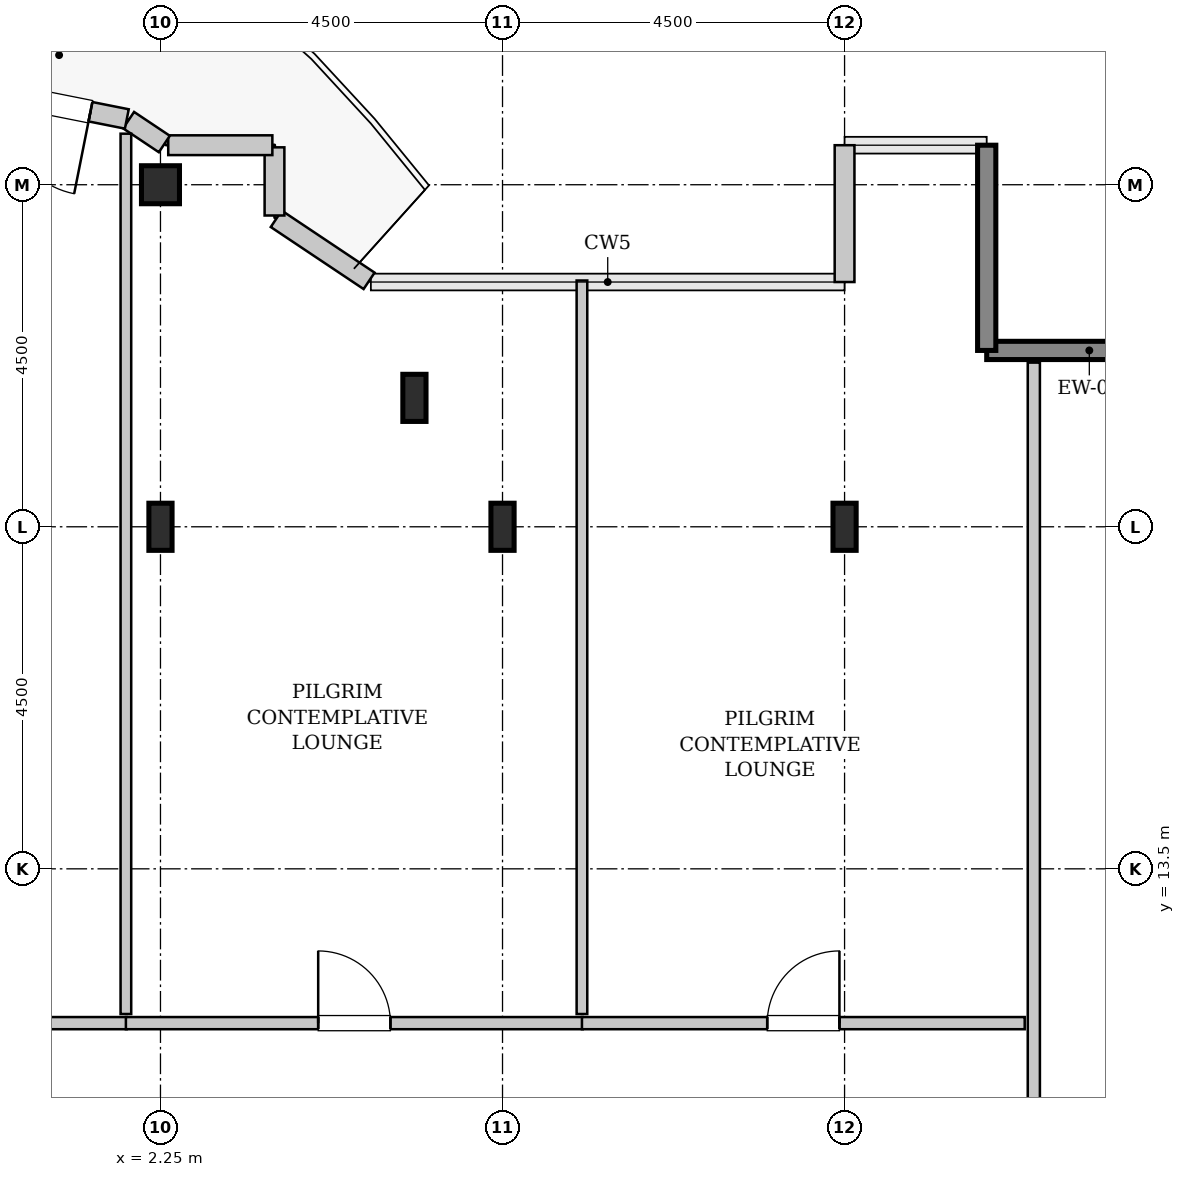
"""IFC4 building model, lengths in metres.
Left out: names, types, materials, properties, quantities, classifications, styles, units other than length and angle.
Written with IfcOpenShell. Run it as: python <this file> out.ifc"""

import sys

from ifc_helpers import new_model, si_unit, direction, frame, frame_2d, origin, origin_2d, place, context, subcontext, project, spatial, rectangle, hollow_rectangle, i_section, extrude, source, transform, mapped, element, fill, save


model = new_model("IFC4")
c1 = context("Model", 3, precision=1e-05, world=origin(), true_north=direction((0.0, 1.0)))
c2 = subcontext(c1, "Body", "Model", "MODEL_VIEW")
j1 = project(units=[si_unit("LENGTHUNIT", "METRE"), si_unit("PLANEANGLEUNIT", "RADIAN")], contexts=[c1])
p1 = place(None, origin())
s1 = spatial("IfcSite", under=j1, at=p1, CompositionType="ELEMENT")
p2 = place(p1, origin())
s2 = spatial("IfcBuilding", under=s1, at=p2, CompositionType="ELEMENT")
p3 = place(p2, frame((0.0, 0.0, 295.0)))
s3 = spatial("IfcBuildingStorey", under=s2, at=p3, CompositionType="ELEMENT", Elevation=295.0)
m1 = source(origin(), c2, "Body", "SweptSolid", [
    extrude(i_section(OverallWidth=0.305, OverallDepth=0.62, WebThickness=0.021, FlangeThickness=0.04, FilletRadius=0.027, at=origin_2d()), origin(), (0.0, 0.0, 1.0), 3.8),
])
p4 = place(p3, frame((2.25, 18.0, 0.0), z_axis=(0.0, 0.0, 1.0), x_axis=(1.0, 0.0, 0.0)))
e1 = element("IfcColumn", 1, at=p4, inside=s3, PredefinedType="COLUMN", context=c2, shape_type="MappedRepresentation", body=[
    mapped(m1, transform((0.0, 0.0, 0.0), x_axis=(1.0, 0.0, 0.0), y_axis=(0.0, 1.0, 0.0), z_axis=(0.0, 0.0, 1.0), scale=1.0)),
])
m2 = source(origin(), c2, "Body", "SweptSolid", [
    extrude(hollow_rectangle(XDim=0.5, YDim=0.5, WallThickness=0.025, InnerFilletRadius=0.025, OuterFilletRadius=0.05, at=origin_2d()), origin(), (0.0, 0.0, 1.0), 3.8),
])
p5 = place(p3, frame((2.25, 22.5, 0.0), z_axis=(0.0, 0.0, 1.0), x_axis=(1.0, 0.0, 0.0)))
e2 = element("IfcColumn", 2, at=p5, inside=s3, PredefinedType="COLUMN", context=c2, shape_type="MappedRepresentation", body=[
    mapped(m2, transform((0.0, 0.0, 0.0), x_axis=(1.0, 0.0, 0.0), y_axis=(0.0, 1.0, 0.0), z_axis=(0.0, 0.0, 1.0), scale=1.0)),
])
for number, where, z_axis, x_axis in (
    (3, (5.591, 19.696, 0.0), (0.0, 0.0, 1.0), (1.0, 0.0, 0.0)),
    (4, (6.75, 18.0, 0.0), (0.0, 0.0, 1.0), (1.0, 0.0, 0.0)),
    (5, (11.25, 18.0, 0.0), (0.0, 0.0, 1.0), (1.0, 0.0, 0.0)),
):
    element("IfcColumn", number, at=place(p3, frame(where, z_axis=z_axis, x_axis=x_axis)), inside=s3, PredefinedType="COLUMN", context=c2, shape_type="MappedRepresentation", body=[
        mapped(m1, transform((0.0, 0.0, 0.0), x_axis=(1.0, 0.0, 0.0), y_axis=(0.0, 1.0, 0.0), z_axis=(0.0, 0.0, 1.0), scale=1.0)),
    ])
m3 = source(origin(), c2, "Body", "SweptSolid", [
    extrude(rectangle(XDim=2.7, YDim=0.24, at=frame_2d((1.35, 0.0))), origin(), (0.0, 0.0, 1.0), 3.55),
])
for number, where, z_axis, x_axis in (
    (6, (15.82, 20.32, 0.0), (0.0, 0.0, 1.0), (-1.0, 0.0, 0.0)),
    (7, (13.12, 20.32, 0.0), (0.0, 0.0, 1.0), (0.0, 1.0, 0.0)),
):
    element("IfcWall", number, at=place(p3, frame(where, z_axis=z_axis, x_axis=x_axis)), inside=s3, PredefinedType="SHEAR", context=c2, shape_type="MappedRepresentation", body=[
        mapped(m3, transform((0.0, 0.0, 0.0), x_axis=(1.0, 0.0, 0.0), y_axis=(0.0, 1.0, 0.0), z_axis=(0.0, 0.0, 1.0), scale=1.0)),
    ])
m4 = source(origin(), c2, "Body", "SweptSolid", [
    extrude(rectangle(XDim=1.8, YDim=0.26, at=frame_2d((0.9, 0.0))), origin(), (0.0, 0.0, 1.0), 3.55),
])
p6 = place(p3, frame((11.25, 23.02, 0.0), z_axis=(0.0, 0.0, 1.0), x_axis=(0.0, -1.0, 0.0)))
e8 = element("IfcWall", 8, at=p6, inside=s3, PredefinedType="SOLIDWALL", context=c2, shape_type="MappedRepresentation", body=[
    mapped(m4, transform((0.0, 0.0, 0.0), x_axis=(1.0, 0.0, 0.0), y_axis=(0.0, 1.0, 0.0), z_axis=(0.0, 0.0, 1.0), scale=1.0)),
])
m5 = source(origin(), c2, "Body", "SweptSolid", [
    extrude(rectangle(XDim=1.469, YDim=0.26, at=frame_2d((0.734, 0.0))), origin(), (0.0, 0.0, 1.0), 3.55),
])
p7 = place(p3, frame((4.995, 21.236, 0.0), z_axis=(0.0, 0.0, 1.0), x_axis=(-0.831461760506, 0.555581983884, 0.0)))
e9 = element("IfcWall", 9, at=p7, inside=s3, PredefinedType="SOLIDWALL", context=c2, shape_type="MappedRepresentation", body=[
    mapped(m5, transform((0.0, 0.0, 0.0), x_axis=(1.0, 0.0, 0.0), y_axis=(0.0, 1.0, 0.0), z_axis=(0.0, 0.0, 1.0), scale=1.0)),
])
m6 = source(origin(), c2, "Body", "SweptSolid", [
    extrude(rectangle(XDim=0.897, YDim=0.26, at=frame_2d((0.448, 0.0))), origin(), (0.0, 0.0, 1.0), 3.55),
])
p8 = place(p3, frame((3.75, 22.095, 0.0), z_axis=(0.0, 0.0, 1.0), x_axis=(0.0, 1.0, 0.0)))
e10 = element("IfcWall", 10, at=p8, inside=s3, PredefinedType="SOLIDWALL", context=c2, shape_type="MappedRepresentation", body=[
    mapped(m6, transform((0.0, 0.0, 0.0), x_axis=(1.0, 0.0, 0.0), y_axis=(0.0, 1.0, 0.0), z_axis=(0.0, 0.0, 1.0), scale=1.0)),
])
m7 = source(origin(), c2, "Body", "SweptSolid", [
    extrude(rectangle(XDim=1.37, YDim=0.26, at=frame_2d((0.685, 0.0))), origin(), (0.0, 0.0, 1.0), 3.55),
])
p9 = place(p3, frame((3.722, 23.02, 0.0), z_axis=(0.0, 0.0, 1.0), x_axis=(-1.0, 0.0, 0.0)))
e11 = element("IfcWall", 11, at=p9, inside=s3, PredefinedType="SOLIDWALL", context=c2, shape_type="MappedRepresentation", body=[
    mapped(m7, transform((0.0, 0.0, 0.0), x_axis=(1.0, 0.0, 0.0), y_axis=(0.0, 1.0, 0.0), z_axis=(0.0, 0.0, 1.0), scale=1.0)),
])
m8 = source(origin(), c2, "Body", "SweptSolid", [
    extrude(rectangle(XDim=0.565, YDim=0.26, at=frame_2d((0.283, 0.0))), origin(), (0.0, 0.0, 1.0), 3.55),
])
p10 = place(p3, frame((2.301, 23.036, 0.0), z_axis=(0.0, 0.0, 1.0), x_axis=(-0.831651492666, 0.555297933317, 0.0)))
e12 = element("IfcWall", 12, at=p10, inside=s3, PredefinedType="SOLIDWALL", context=c2, shape_type="MappedRepresentation", body=[
    mapped(m8, transform((0.0, 0.0, 0.0), x_axis=(1.0, 0.0, 0.0), y_axis=(0.0, 1.0, 0.0), z_axis=(0.0, 0.0, 1.0), scale=1.0)),
])
m9 = source(origin(), c2, "Body", "SweptSolid", [
    extrude(rectangle(XDim=4.137, YDim=0.26, at=frame_2d((2.068, 0.0))), origin(), (0.0, 0.0, 1.0), 3.55),
])
p11 = place(p3, frame((1.807, 23.365, 0.0), z_axis=(0.0, 0.0, 1.0), x_axis=(-0.980782170794, 0.195105954428, 0.0)))
e13 = element("IfcWall", 13, at=p11, inside=s3, PredefinedType="SOLIDWALL", context=c2, shape_type="MappedRepresentation", body=[
    mapped(m9, transform((0.0, 0.0, 0.0), x_axis=(1.0, 0.0, 0.0), y_axis=(0.0, 1.0, 0.0), z_axis=(0.0, 0.0, 1.0), scale=1.0)),
])
p12 = place(p11, frame((0.488, 0.0, 0.0)))
e14 = element("IfcOpeningElement", 14, at=p12, cuts=e13, PredefinedType="OPENING", context=c2, shape_type="SweptSolid", body=[
    extrude(rectangle(XDim=1.1, YDim=2.2, at=frame_2d((0.55, 1.1))), frame((0.0, 0.14, 0.0), z_axis=(0.0, -1.0, 0.0), x_axis=(1.0, 0.0, 0.0)), (0.0, 0.0, 1.0), 0.28),
])
m10 = source(origin(), c2, "Body", "SweptSolid", [
    extrude(rectangle(XDim=11.665, YDim=0.16, at=frame_2d((5.833, 0.0))), origin(), (0.0, 0.0, 1.0), 3.535),
])
p13 = place(p3, frame((13.74, 8.495, 0.0), z_axis=(0.0, 0.0, 1.0), x_axis=(0.0, 1.0, 0.0)))
e15 = element("IfcWall", 15, at=p13, inside=s3, PredefinedType="PARTITIONING", context=c2, shape_type="MappedRepresentation", body=[
    mapped(m10, transform((0.0, 0.0, 0.0), x_axis=(1.0, 0.0, 0.0), y_axis=(0.0, 1.0, 0.0), z_axis=(0.0, 0.0, 1.0), scale=1.0)),
])
p14 = place(p13, frame((1.032, 0.0, 0.0)))
e16 = element("IfcOpeningElement", 16, at=p14, cuts=e15, PredefinedType="OPENING", context=c2, shape_type="SweptSolid", body=[
    extrude(rectangle(XDim=0.95, YDim=2.1, at=frame_2d((0.475, 1.05))), frame((0.0, 0.09, 0.0), z_axis=(0.0, -1.0, 0.0), x_axis=(1.0, 0.0, 0.0)), (0.0, 0.0, 1.0), 0.18),
])
m11 = source(origin(), c2, "Body", "SweptSolid", [
    extrude(rectangle(XDim=4.605, YDim=0.16, at=frame_2d((2.302, 0.0))), origin(), (0.0, 0.0, 1.0), 3.535),
])
p15 = place(p3, frame((-2.8, 11.47, 0.0), z_axis=(0.0, 0.0, 1.0), x_axis=(1.0, 0.0, 0.0)))
e17 = element("IfcWall", 17, at=p15, inside=s3, PredefinedType="PARTITIONING", context=c2, shape_type="MappedRepresentation", body=[
    mapped(m11, transform((0.0, 0.0, 0.0), x_axis=(1.0, 0.0, 0.0), y_axis=(0.0, 1.0, 0.0), z_axis=(0.0, 0.0, 1.0), scale=1.0)),
])
p16 = place(p15, frame((1.827, 0.0, 0.0)))
e18 = element("IfcOpeningElement", 18, at=p16, cuts=e17, PredefinedType="OPENING", context=c2, shape_type="SweptSolid", body=[
    extrude(rectangle(XDim=0.95, YDim=2.1, at=frame_2d((0.475, 1.05))), frame((0.0, 0.09, 0.0), z_axis=(0.0, -1.0, 0.0), x_axis=(1.0, 0.0, 0.0)), (0.0, 0.0, 1.0), 0.18),
])
m12 = source(origin(), c2, "Body", "SweptSolid", [
    extrude(rectangle(XDim=11.581, YDim=0.14, at=frame_2d((5.791, 0.0))), origin(), (0.0, 0.0, 1.0), 2.925),
])
p17 = place(p3, frame((1.795, 11.59, 0.0), z_axis=(0.0, 0.0, 1.0), x_axis=(0.0, 1.0, 0.0)))
e19 = element("IfcWall", 19, at=p17, inside=s3, PredefinedType="PARTITIONING", context=c2, shape_type="MappedRepresentation", body=[
    mapped(m12, transform((0.0, 0.0, 0.0), x_axis=(1.0, 0.0, 0.0), y_axis=(0.0, 1.0, 0.0), z_axis=(0.0, 0.0, 1.0), scale=1.0)),
])
m13 = source(origin(), c2, "Body", "SweptSolid", [
    extrude(rectangle(XDim=6.01, YDim=0.16, at=frame_2d((3.005, 0.0))), origin(), (0.0, 0.0, 1.0), 3.535),
])
p18 = place(p3, frame((1.795, 11.47, 0.0), z_axis=(0.0, 0.0, 1.0), x_axis=(1.0, 0.0, 0.0)))
e20 = element("IfcWall", 20, at=p18, inside=s3, PredefinedType="PARTITIONING", context=c2, shape_type="MappedRepresentation", body=[
    mapped(m13, transform((0.0, 0.0, 0.0), x_axis=(1.0, 0.0, 0.0), y_axis=(0.0, 1.0, 0.0), z_axis=(0.0, 0.0, 1.0), scale=1.0)),
])
p19 = place(p18, frame((2.53, 0.0, 0.0)))
e21 = element("IfcOpeningElement", 21, at=p19, cuts=e20, PredefinedType="OPENING", context=c2, shape_type="SweptSolid", body=[
    extrude(rectangle(XDim=0.95, YDim=2.1, at=frame_2d((0.475, 1.05))), frame((0.0, 0.09, 0.0), z_axis=(0.0, -1.0, 0.0), x_axis=(1.0, 0.0, 0.0)), (0.0, 0.0, 1.0), 0.18),
])
m14 = source(origin(), c2, "Body", "SweptSolid", [
    extrude(rectangle(XDim=9.65, YDim=0.14, at=frame_2d((4.825, 0.0))), origin(), (0.0, 0.0, 1.0), 3.535),
])
p20 = place(p3, frame((7.795, 11.59, 0.0), z_axis=(0.0, 0.0, 1.0), x_axis=(0.0, 1.0, 0.0)))
e22 = element("IfcWall", 22, at=p20, inside=s3, PredefinedType="PARTITIONING", context=c2, shape_type="MappedRepresentation", body=[
    mapped(m14, transform((0.0, 0.0, 0.0), x_axis=(1.0, 0.0, 0.0), y_axis=(0.0, 1.0, 0.0), z_axis=(0.0, 0.0, 1.0), scale=1.0)),
])
m15 = source(origin(), c2, "Body", "SweptSolid", [
    extrude(rectangle(XDim=5.825, YDim=0.16, at=frame_2d((2.913, 0.0))), origin(), (0.0, 0.0, 1.0), 3.535),
])
p21 = place(p3, frame((7.795, 11.47, 0.0), z_axis=(0.0, 0.0, 1.0), x_axis=(1.0, 0.0, 0.0)))
e23 = element("IfcWall", 23, at=p21, inside=s3, PredefinedType="PARTITIONING", context=c2, shape_type="MappedRepresentation", body=[
    mapped(m15, transform((0.0, 0.0, 0.0), x_axis=(1.0, 0.0, 0.0), y_axis=(0.0, 1.0, 0.0), z_axis=(0.0, 0.0, 1.0), scale=1.0)),
])
p22 = place(p21, frame((2.438, 0.0, 0.0)))
e24 = element("IfcOpeningElement", 24, at=p22, cuts=e23, PredefinedType="OPENING", context=c2, shape_type="SweptSolid", body=[
    extrude(rectangle(XDim=0.95, YDim=2.1, at=frame_2d((0.475, 1.05))), frame((0.0, 0.09, 0.0), z_axis=(0.0, -1.0, 0.0), x_axis=(1.0, 0.0, 0.0)), (0.0, 0.0, 1.0), 0.18),
])
m16 = source(origin(), c2, "Body", "SweptSolid", [
    extrude(rectangle(XDim=1.1, YDim=2.2, at=frame_2d((0.55, 1.1))), frame((0.0, 0.025, 0.0), z_axis=(0.0, -1.0, 0.0), x_axis=(1.0, 0.0, 0.0)), (0.0, 0.0, 1.0), 0.05),
])
p23 = place(p12, origin())
e25 = element("IfcDoor", 25, at=p23, inside=s3, OperationType="SINGLE_SWING_LEFT", PredefinedType="DOOR", context=c2, shape_type="MappedRepresentation", body=[
    mapped(m16, transform((0.0, 0.0, 0.0), x_axis=(1.0, 0.0, 0.0), y_axis=(0.0, 1.0, 0.0), z_axis=(0.0, 0.0, 1.0), scale=1.0)),
])
fill(e14, e25)
m17 = source(origin(), c2, "Body", "SweptSolid", [
    extrude(rectangle(XDim=0.95, YDim=2.1, at=frame_2d((0.475, 1.05))), frame((0.0, 0.025, 0.0), z_axis=(0.0, -1.0, 0.0), x_axis=(1.0, 0.0, 0.0)), (0.0, 0.0, 1.0), 0.05),
])
p24 = place(p19, origin())
e26 = element("IfcDoor", 26, at=p24, inside=s3, OperationType="SINGLE_SWING_LEFT", PredefinedType="DOOR", context=c2, shape_type="MappedRepresentation", body=[
    mapped(m17, transform((0.0, 0.0, 0.0), x_axis=(1.0, 0.0, 0.0), y_axis=(0.0, 1.0, 0.0), z_axis=(0.0, 0.0, 1.0), scale=1.0)),
])
fill(e21, e26)
p25 = place(p22, origin())
e27 = element("IfcDoor", 27, at=p25, inside=s3, OperationType="SINGLE_SWING_RIGHT", PredefinedType="DOOR", context=c2, shape_type="MappedRepresentation", body=[
    mapped(m17, transform((0.0, 0.0, 0.0), x_axis=(1.0, 0.0, 0.0), y_axis=(0.0, 1.0, 0.0), z_axis=(0.0, 0.0, 1.0), scale=1.0)),
])
fill(e24, e27)
save(model, sys.argv[1])
